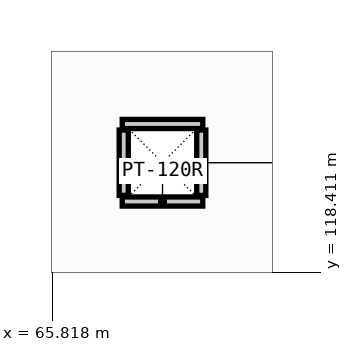
"""IFC4 building model, lengths in metres.
Left out: names, types, materials, properties, quantities, classifications, styles, units other than length and angle.
Written with IfcOpenShell. Run it as: python <this file> out.ifc"""

import sys

from ifc_helpers import new_model, si_unit, direction, frame, frame_2d, origin, place, context, subcontext, project, spatial, rectangle, extrude, element, save


model = new_model("IFC4")
c1 = context("Model", 3, precision=1e-05, world=origin(), true_north=direction((0.0, 1.0)))
c2 = subcontext(c1, "Body", "Model", "MODEL_VIEW")
j1 = project(units=[si_unit("LENGTHUNIT", "METRE"), si_unit("PLANEANGLEUNIT", "RADIAN")], contexts=[c1])
p1 = place(None, origin())
s1 = spatial("IfcSite", under=j1, at=p1, CompositionType="ELEMENT")
p2 = place(p1, origin())
s2 = spatial("IfcBuilding", under=s1, at=p2, CompositionType="ELEMENT")
p3 = place(p2, frame((0.0, 0.0, 9.0)))
s3 = spatial("IfcBuildingStorey", under=s2, at=p3, CompositionType="ELEMENT", Elevation=9.0)
for number, where, z_axis, x_axis in (
    (1, (66.74, 119.34, 0.0), (0.0, 0.0, 1.0), (1.0, 0.0, 0.0)),
    (2, (66.74, 120.36, 0.0), (0.0, 0.0, 1.0), (1.0, 0.0, 0.0)),
):
    element("IfcWall", number, at=place(p3, frame(where, z_axis=z_axis, x_axis=x_axis)), inside=s3, PredefinedType="PARTITIONING", context=c2, shape_type="SweptSolid", body=[
        extrude(rectangle(XDim=1.06, YDim=0.12, at=frame_2d((0.53, 0.0))), origin(), (0.0, 0.0, 1.0), 2.95),
    ])
for number, where, z_axis, x_axis in (
    (3, (66.76, 119.42, 0.0), (0.0, 0.0, 1.0), (0.0, 1.0, 0.0)),
    (4, (67.78, 119.42, 0.0), (0.0, 0.0, 1.0), (0.0, 1.0, 0.0)),
):
    element("IfcWall", number, at=place(p3, frame(where, z_axis=z_axis, x_axis=x_axis)), inside=s3, PredefinedType="PARTITIONING", context=c2, shape_type="SweptSolid", body=[
        extrude(rectangle(XDim=0.86, YDim=0.12, at=frame_2d((0.43, 0.0))), origin(), (0.0, 0.0, 1.0), 2.95),
    ])
save(model, sys.argv[1])
